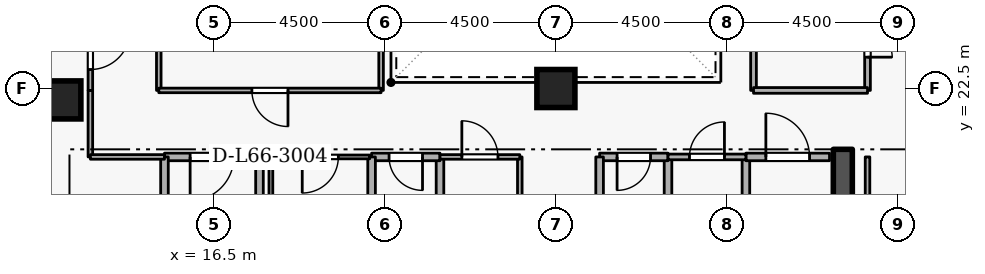
"""IFC4 building model, lengths in metres.
Left out: names, types, materials, properties, quantities, classifications, styles, units other than length and angle.
Written with IfcOpenShell. Run it as: python <this file> out.ifc"""

import sys

from ifc_helpers import new_model, si_unit, direction, frame, frame_2d, origin, origin_2d, place, context, subcontext, project, spatial, rectangle, extrude, element, fill, save


model = new_model("IFC4")
c1 = context("Model", 3, precision=1e-05, world=origin(), true_north=direction((0.0, 1.0)))
c2 = subcontext(c1, "Body", "Model", "MODEL_VIEW")
j1 = project(units=[si_unit("LENGTHUNIT", "METRE"), si_unit("PLANEANGLEUNIT", "RADIAN")], contexts=[c1])
p1 = place(None, origin())
s1 = spatial("IfcSite", under=j1, at=p1, CompositionType="ELEMENT")
p2 = place(p1, origin())
s2 = spatial("IfcBuilding", under=s1, at=p2, CompositionType="ELEMENT")
p3 = place(p2, frame((0.0, 0.0, 247.5)))
s3 = spatial("IfcBuildingStorey", under=s2, at=p3, CompositionType="ELEMENT", Elevation=247.5)
p4 = place(p3, frame((33.05, 15.1, 0.0), z_axis=(0.0, 0.0, 1.0), x_axis=(0.0, 1.0, 0.0)))
e1 = element("IfcWall", 1, at=p4, inside=s3, PredefinedType="SHEAR", context=c2, shape_type="SweptSolid", body=[
    extrude(rectangle(XDim=5.8, YDim=0.5, at=frame_2d((2.9, 0.0))), origin(), (0.0, 0.0, 1.0), 3.6),
])
for number, where, z_axis, x_axis in (
    (2, (12.5, 22.2, 0.0), (0.0, 0.0, 1.0), (1.0, 0.0, 0.0)),
    (3, (25.5, 22.5, 0.0), (0.0, 0.0, 1.0), (1.0, 0.0, 0.0)),
):
    element("IfcColumn", number, at=place(p3, frame(where, z_axis=z_axis, x_axis=x_axis)), inside=s3, PredefinedType="COLUMN", context=c2, shape_type="SweptSolid", body=[
        extrude(rectangle(XDim=1.0, YDim=1.0, at=origin_2d()), origin(), (0.0, 0.0, 1.0), 3.6),
    ])
p5 = place(p3, frame((17.7, 18.4, 0.0), z_axis=(0.0, 0.0, 1.0), x_axis=(0.0, 1.0, 0.0)))
e4 = element("IfcWall", 4, at=p5, inside=s3, PredefinedType="STANDARD", context=c2, shape_type="SweptSolid", body=[
    extrude(rectangle(XDim=2.3, YDim=0.2, at=frame_2d((1.15, 0.0))), origin(), (0.0, 0.0, 1.0), 2.545),
])
p6 = place(p3, frame((17.7, 20.7, 0.0), z_axis=(0.0, 0.0, 1.0), x_axis=(-1.0, 0.0, 0.0)))
e5 = element("IfcWall", 5, at=p6, inside=s3, PredefinedType="STANDARD", context=c2, shape_type="SweptSolid", body=[
    extrude(rectangle(XDim=2.5, YDim=0.2, at=frame_2d((1.25, 0.0))), origin(), (0.0, 0.0, 1.0), 3.34),
])
p7 = place(p6, frame((0.675, 0.0, 0.0)))
e6 = element("IfcOpeningElement", 6, at=p7, cuts=e5, PredefinedType="OPENING", context=c2, shape_type="SweptSolid", body=[
    extrude(rectangle(XDim=1.15, YDim=2.1, at=frame_2d((0.575, 1.05))), frame((0.0, 0.11, 0.0), z_axis=(0.0, -1.0, 0.0), x_axis=(1.0, 0.0, 0.0)), (0.0, 0.0, 1.0), 0.22),
])
p8 = place(p3, frame((15.2, 20.7, 0.0), z_axis=(0.0, 0.0, 1.0), x_axis=(0.0, -1.0, 0.0)))
e7 = element("IfcWall", 7, at=p8, inside=s3, PredefinedType="STANDARD", context=c2, shape_type="SweptSolid", body=[
    extrude(rectangle(XDim=5.7, YDim=0.2, at=frame_2d((2.85, 0.0))), origin(), (0.0, 0.0, 1.0), 3.34),
])
p9 = place(p3, frame((28.45, 18.65, 0.0), z_axis=(0.0, 0.0, 1.0), x_axis=(0.0, 1.0, 0.0)))
e8 = element("IfcWall", 8, at=p9, inside=s3, PredefinedType="STANDARD", context=c2, shape_type="SweptSolid", body=[
    extrude(rectangle(XDim=2.05, YDim=0.2, at=frame_2d((1.025, 0.0))), origin(), (0.0, 0.0, 1.0), 3.34),
])
p10 = place(p3, frame((28.45, 20.7, 0.0), z_axis=(0.0, 0.0, 1.0), x_axis=(-1.0, 0.0, 0.0)))
e9 = element("IfcWall", 9, at=p10, inside=s3, PredefinedType="STANDARD", context=c2, shape_type="SweptSolid", body=[
    extrude(rectangle(XDim=1.8, YDim=0.2, at=frame_2d((0.9, 0.0))), origin(), (0.0, 0.0, 1.0), 3.34),
])
p11 = place(p10, frame((0.46, 0.0, 0.0)))
e10 = element("IfcOpeningElement", 10, at=p11, cuts=e9, PredefinedType="OPENING", context=c2, shape_type="SweptSolid", body=[
    extrude(rectangle(XDim=0.88, YDim=2.04, at=frame_2d((0.44, 1.02))), frame((0.0, 0.11, 0.0), z_axis=(0.0, -1.0, 0.0), x_axis=(1.0, 0.0, 0.0)), (0.0, 0.0, 1.0), 0.22),
])
for number, where, z_axis, x_axis in (
    (11, (26.65, 20.7, 0.0), (0.0, 0.0, 1.0), (0.0, -1.0, 0.0)),
    (12, (22.45, 18.65, 0.0), (0.0, 0.0, 1.0), (0.0, 1.0, 0.0)),
):
    element("IfcWall", number, at=place(p3, frame(where, z_axis=z_axis, x_axis=x_axis)), inside=s3, PredefinedType="STANDARD", context=c2, shape_type="SweptSolid", body=[
        extrude(rectangle(XDim=2.05, YDim=0.2, at=frame_2d((1.025, 0.0))), origin(), (0.0, 0.0, 1.0), 3.34),
    ])
p12 = place(p3, frame((22.45, 20.7, 0.0), z_axis=(0.0, 0.0, 1.0), x_axis=(-1.0, 0.0, 0.0)))
e13 = element("IfcWall", 13, at=p12, inside=s3, PredefinedType="STANDARD", context=c2, shape_type="SweptSolid", body=[
    extrude(rectangle(XDim=1.8, YDim=0.2, at=frame_2d((0.9, 0.0))), origin(), (0.0, 0.0, 1.0), 3.34),
])
p13 = place(p12, frame((0.46, 0.0, 0.0)))
e14 = element("IfcOpeningElement", 14, at=p13, cuts=e13, PredefinedType="OPENING", context=c2, shape_type="SweptSolid", body=[
    extrude(rectangle(XDim=0.88, YDim=2.04, at=frame_2d((0.44, 1.02))), frame((0.0, 0.11, 0.0), z_axis=(0.0, -1.0, 0.0), x_axis=(1.0, 0.0, 0.0)), (0.0, 0.0, 1.0), 0.22),
])
for number, where, z_axis, x_axis in (
    (15, (20.65, 20.7, 0.0), (0.0, 0.0, 1.0), (0.0, -1.0, 0.0)),
    (16, (30.5, 18.65, 0.0), (0.0, 0.0, 1.0), (0.0, 1.0, 0.0)),
):
    element("IfcWall", number, at=place(p3, frame(where, z_axis=z_axis, x_axis=x_axis)), inside=s3, PredefinedType="STANDARD", context=c2, shape_type="SweptSolid", body=[
        extrude(rectangle(XDim=2.05, YDim=0.2, at=frame_2d((1.025, 0.0))), origin(), (0.0, 0.0, 1.0), 3.34),
    ])
p14 = place(p3, frame((30.5, 20.7, 0.0), z_axis=(0.0, 0.0, 1.0), x_axis=(1.0, 0.0, 0.0)))
e17 = element("IfcWall", 17, at=p14, inside=s3, PredefinedType="STANDARD", context=c2, shape_type="SweptSolid", body=[
    extrude(rectangle(XDim=2.2, YDim=0.2, at=frame_2d((1.1, 0.0))), origin(), (0.0, 0.0, 1.0), 3.34),
])
p15 = place(p14, frame((0.525, 0.0, 0.0)))
e18 = element("IfcOpeningElement", 18, at=p15, cuts=e17, PredefinedType="OPENING", context=c2, shape_type="SweptSolid", body=[
    extrude(rectangle(XDim=1.15, YDim=2.1, at=frame_2d((0.575, 1.05))), frame((0.0, 0.11, 0.0), z_axis=(0.0, -1.0, 0.0), x_axis=(1.0, 0.0, 0.0)), (0.0, 0.0, 1.0), 0.22),
])
p16 = place(p3, frame((20.6, 20.7, 0.0), z_axis=(0.0, 0.0, 1.0), x_axis=(-1.0, 0.0, 0.0)))
e19 = element("IfcWall", 19, at=p16, inside=s3, PredefinedType="PARTITIONING", context=c2, shape_type="SweptSolid", body=[
    extrude(rectangle(XDim=2.6, YDim=0.1, at=frame_2d((1.3, 0.0))), origin(), (0.0, 0.0, 1.0), 3.34),
])
p17 = place(p16, frame((0.825, 0.0, 0.0)))
e20 = element("IfcOpeningElement", 20, at=p17, cuts=e19, PredefinedType="OPENING", context=c2, shape_type="SweptSolid", body=[
    extrude(rectangle(XDim=0.95, YDim=2.1, at=frame_2d((0.475, 1.05))), frame((0.0, 0.06, 0.0), z_axis=(0.0, -1.0, 0.0), x_axis=(1.0, 0.0, 0.0)), (0.0, 0.0, 1.0), 0.12),
])
p18 = place(p3, frame((18.0, 20.7, 0.0), z_axis=(0.0, 0.0, 1.0), x_axis=(0.0, -1.0, 0.0)))
e21 = element("IfcWall", 21, at=p18, inside=s3, PredefinedType="PARTITIONING", context=c2, shape_type="SweptSolid", body=[
    extrude(rectangle(XDim=2.05, YDim=0.1, at=frame_2d((1.025, 0.0))), origin(), (0.0, 0.0, 1.0), 2.545),
])
p19 = place(p3, frame((24.55, 20.7, 0.0), z_axis=(0.0, 0.0, 1.0), x_axis=(0.0, -1.0, 0.0)))
e22 = element("IfcWall", 22, at=p19, inside=s3, PredefinedType="PARTITIONING", context=c2, shape_type="SweptSolid", body=[
    extrude(rectangle(XDim=2.05, YDim=0.12, at=frame_2d((1.025, 0.0))), origin(), (0.0, 0.0, 1.0), 3.34),
])
p20 = place(p3, frame((22.45, 20.7, 0.0), z_axis=(0.0, 0.0, 1.0), x_axis=(1.0, 0.0, 0.0)))
e23 = element("IfcWall", 23, at=p20, inside=s3, PredefinedType="PARTITIONING", context=c2, shape_type="SweptSolid", body=[
    extrude(rectangle(XDim=2.1, YDim=0.12, at=frame_2d((1.05, 0.0))), origin(), (0.0, 0.0, 1.0), 3.34),
])
p21 = place(p20, frame((0.575, 0.0, 0.0)))
e24 = element("IfcOpeningElement", 24, at=p21, cuts=e23, PredefinedType="OPENING", context=c2, shape_type="SweptSolid", body=[
    extrude(rectangle(XDim=0.95, YDim=2.1, at=frame_2d((0.475, 1.05))), frame((0.0, 0.07, 0.0), z_axis=(0.0, -1.0, 0.0), x_axis=(1.0, 0.0, 0.0)), (0.0, 0.0, 1.0), 0.14),
])
p22 = place(p3, frame((28.45, 20.7, 0.0), z_axis=(0.0, 0.0, 1.0), x_axis=(1.0, 0.0, 0.0)))
e25 = element("IfcWall", 25, at=p22, inside=s3, PredefinedType="PARTITIONING", context=c2, shape_type="SweptSolid", body=[
    extrude(rectangle(XDim=2.05, YDim=0.15, at=frame_2d((1.025, 0.0))), origin(), (0.0, 0.0, 1.0), 3.34),
])
p23 = place(p22, frame((0.565, 0.0, 0.0)))
e26 = element("IfcOpeningElement", 26, at=p23, cuts=e25, PredefinedType="OPENING", context=c2, shape_type="SweptSolid", body=[
    extrude(rectangle(XDim=0.92, YDim=2.08, at=frame_2d((0.46, 1.04))), frame((0.0, 0.085, 0.0), z_axis=(0.0, -1.0, 0.0), x_axis=(1.0, 0.0, 0.0)), (0.0, 0.0, 1.0), 0.17),
])
p24 = place(p3, frame((33.7, 20.7, 0.0), z_axis=(0.0, 0.0, 1.0), x_axis=(0.0, -1.0, 0.0)))
e27 = element("IfcWall", 27, at=p24, inside=s3, PredefinedType="PARTITIONING", context=c2, shape_type="SweptSolid", body=[
    extrude(rectangle(XDim=5.9, YDim=0.12, at=frame_2d((2.95, 0.0))), origin(), (0.0, 0.0, 1.0), 3.34),
])
p25 = place(p3, frame((13.25, 22.45, 0.0), z_axis=(0.0, 0.0, 1.0), x_axis=(0.0, -1.0, 0.0)))
e28 = element("IfcWall", 28, at=p25, inside=s3, PredefinedType="PARTITIONING", context=c2, shape_type="SweptSolid", body=[
    extrude(rectangle(XDim=1.75, YDim=0.12, at=frame_2d((0.875, 0.0))), origin(), (0.0, 0.0, 1.0), 3.34),
])
p26 = place(p3, frame((13.25, 20.7, 0.0), z_axis=(0.0, 0.0, 1.0), x_axis=(1.0, 0.0, 0.0)))
e29 = element("IfcWall", 29, at=p26, inside=s3, PredefinedType="PARTITIONING", context=c2, shape_type="SweptSolid", body=[
    extrude(rectangle(XDim=1.95, YDim=0.12, at=frame_2d((0.975, 0.0))), origin(), (0.0, 0.0, 1.0), 3.34),
])
p27 = place(p3, frame((13.25, 24.6, 0.0), z_axis=(0.0, 0.0, 1.0), x_axis=(0.0, -1.0, 0.0)))
e30 = element("IfcWall", 30, at=p27, inside=s3, PredefinedType="PARTITIONING", context=c2, shape_type="SweptSolid", body=[
    extrude(rectangle(XDim=2.15, YDim=0.12, at=frame_2d((1.075, 0.0))), origin(), (0.0, 0.0, 1.0), 3.34),
])
p28 = place(p27, frame((0.55, 0.0, 0.0)))
e31 = element("IfcOpeningElement", 31, at=p28, cuts=e30, PredefinedType="OPENING", context=c2, shape_type="SweptSolid", body=[
    extrude(rectangle(XDim=1.05, YDim=2.1, at=frame_2d((0.525, 1.05))), frame((0.0, 0.07, 0.0), z_axis=(0.0, -1.0, 0.0), x_axis=(1.0, 0.0, 0.0)), (0.0, 0.0, 1.0), 0.14),
])
for number, where, z_axis, x_axis in (
    (32, (15.05, 22.45, 0.0), (0.0, 0.0, 1.0), (0.0, 1.0, 0.0)),
    (33, (20.9, 26.2, 0.0), (0.0, 0.0, 1.0), (0.0, -1.0, 0.0)),
):
    element("IfcWall", number, at=place(p3, frame(where, z_axis=z_axis, x_axis=x_axis)), inside=s3, PredefinedType="PARTITIONING", context=c2, shape_type="SweptSolid", body=[
        extrude(rectangle(XDim=3.75, YDim=0.12, at=frame_2d((1.875, 0.0))), origin(), (0.0, 0.0, 1.0), 3.34),
    ])
p29 = place(p3, frame((20.9, 22.45, 0.0), z_axis=(0.0, 0.0, 1.0), x_axis=(-1.0, 0.0, 0.0)))
e34 = element("IfcWall", 34, at=p29, inside=s3, PredefinedType="PARTITIONING", context=c2, shape_type="SweptSolid", body=[
    extrude(rectangle(XDim=5.85, YDim=0.12, at=frame_2d((2.925, 0.0))), origin(), (0.0, 0.0, 1.0), 3.34),
])
p30 = place(p29, frame((2.45, 0.0, 0.0)))
e35 = element("IfcOpeningElement", 35, at=p30, cuts=e34, PredefinedType="OPENING", context=c2, shape_type="SweptSolid", body=[
    extrude(rectangle(XDim=0.95, YDim=2.1, at=frame_2d((0.475, 1.05))), frame((0.0, 0.07, 0.0), z_axis=(0.0, -1.0, 0.0), x_axis=(1.0, 0.0, 0.0)), (0.0, 0.0, 1.0), 0.14),
])
p31 = place(p3, frame((30.7, 22.45, 0.0), z_axis=(0.0, 0.0, 1.0), x_axis=(0.0, 1.0, 0.0)))
e36 = element("IfcWall", 36, at=p31, inside=s3, PredefinedType="PARTITIONING", context=c2, shape_type="SweptSolid", body=[
    extrude(rectangle(XDim=3.05, YDim=0.15, at=frame_2d((1.525, 0.0))), origin(), (0.0, 0.0, 1.0), 3.34),
])
p32 = place(p3, frame((33.7, 25.5, 0.0), z_axis=(0.0, 0.0, 1.0), x_axis=(0.0, -1.0, 0.0)))
e37 = element("IfcWall", 37, at=p32, inside=s3, PredefinedType="PARTITIONING", context=c2, shape_type="SweptSolid", body=[
    extrude(rectangle(XDim=3.05, YDim=0.15, at=frame_2d((1.525, 0.0))), origin(), (0.0, 0.0, 1.0), 3.34),
])
p33 = place(p32, frame((0.875, 0.0, 0.0)))
e38 = element("IfcOpeningElement", 38, at=p33, cuts=e37, PredefinedType="OPENING", context=c2, shape_type="SweptSolid", body=[
    extrude(rectangle(XDim=1.3, YDim=2.12, at=frame_2d((0.65, 1.06))), frame((0.0, 0.085, 0.0), z_axis=(0.0, -1.0, 0.0), x_axis=(1.0, 0.0, 0.0)), (0.0, 0.0, 1.0), 0.17),
])
p34 = place(p3, frame((33.7, 22.45, 0.0), z_axis=(0.0, 0.0, 1.0), x_axis=(-1.0, 0.0, 0.0)))
e39 = element("IfcWall", 39, at=p34, inside=s3, PredefinedType="PARTITIONING", context=c2, shape_type="SweptSolid", body=[
    extrude(rectangle(XDim=3.0, YDim=0.15, at=frame_2d((1.5, 0.0))), origin(), (0.0, 0.0, 1.0), 3.34),
])
p35 = place(p7, origin())
e40 = element("IfcDoor", 40, at=p35, inside=s3, OperationType="SINGLE_SWING_RIGHT", PredefinedType="DOOR", context=c2, shape_type="SweptSolid", body=[
    extrude(rectangle(XDim=1.15, YDim=2.1, at=frame_2d((0.575, 1.05))), frame((0.0, 0.025, 0.0), z_axis=(0.0, -1.0, 0.0), x_axis=(1.0, 0.0, 0.0)), (0.0, 0.0, 1.0), 0.05),
])
fill(e6, e40)
p36 = place(p11, origin())
e41 = element("IfcDoor", 41, at=p36, inside=s3, OperationType="SINGLE_SWING_RIGHT", PredefinedType="DOOR", context=c2, shape_type="SweptSolid", body=[
    extrude(rectangle(XDim=0.88, YDim=2.04, at=frame_2d((0.44, 1.02))), frame((0.0, 0.025, 0.0), z_axis=(0.0, -1.0, 0.0), x_axis=(1.0, 0.0, 0.0)), (0.0, 0.0, 1.0), 0.05),
])
fill(e10, e41)
p37 = place(p13, origin())
e42 = element("IfcDoor", 42, at=p37, inside=s3, OperationType="SINGLE_SWING_LEFT", PredefinedType="DOOR", context=c2, shape_type="SweptSolid", body=[
    extrude(rectangle(XDim=0.88, YDim=2.04, at=frame_2d((0.44, 1.02))), frame((0.0, 0.025, 0.0), z_axis=(0.0, -1.0, 0.0), x_axis=(1.0, 0.0, 0.0)), (0.0, 0.0, 1.0), 0.05),
])
fill(e14, e42)
p38 = place(p17, origin())
e43 = element("IfcDoor", 43, at=p38, inside=s3, OperationType="SINGLE_SWING_RIGHT", PredefinedType="DOOR", context=c2, shape_type="SweptSolid", body=[
    extrude(rectangle(XDim=0.95, YDim=2.1, at=frame_2d((0.475, 1.05))), frame((0.0, 0.025, 0.0), z_axis=(0.0, -1.0, 0.0), x_axis=(1.0, 0.0, 0.0)), (0.0, 0.0, 1.0), 0.05),
])
fill(e20, e43)
p39 = place(p21, origin())
e44 = element("IfcDoor", 44, at=p39, inside=s3, OperationType="SINGLE_SWING_LEFT", PredefinedType="DOOR", context=c2, shape_type="SweptSolid", body=[
    extrude(rectangle(XDim=0.95, YDim=2.1, at=frame_2d((0.475, 1.05))), frame((0.0, 0.025, 0.0), z_axis=(0.0, -1.0, 0.0), x_axis=(1.0, 0.0, 0.0)), (0.0, 0.0, 1.0), 0.05),
])
fill(e24, e44)
p40 = place(p23, origin())
e45 = element("IfcDoor", 45, at=p40, inside=s3, OperationType="SINGLE_SWING_RIGHT", PredefinedType="DOOR", context=c2, shape_type="SweptSolid", body=[
    extrude(rectangle(XDim=0.92, YDim=2.08, at=frame_2d((0.46, 1.04))), frame((0.0, 0.025, 0.0), z_axis=(0.0, -1.0, 0.0), x_axis=(1.0, 0.0, 0.0)), (0.0, 0.0, 1.0), 0.05),
])
fill(e26, e45)
p41 = place(p15, origin())
e46 = element("IfcDoor", 46, at=p41, inside=s3, OperationType="SINGLE_SWING_LEFT", PredefinedType="DOOR", context=c2, shape_type="SweptSolid", body=[
    extrude(rectangle(XDim=1.15, YDim=2.1, at=frame_2d((0.575, 1.05))), frame((0.0, 0.025, 0.0), z_axis=(0.0, -1.0, 0.0), x_axis=(1.0, 0.0, 0.0)), (0.0, 0.0, 1.0), 0.05),
])
fill(e18, e46)
p42 = place(p28, origin())
e47 = element("IfcDoor", 47, at=p42, inside=s3, OperationType="SINGLE_SWING_LEFT", PredefinedType="DOOR", context=c2, shape_type="SweptSolid", body=[
    extrude(rectangle(XDim=1.05, YDim=2.1, at=frame_2d((0.525, 1.05))), frame((0.0, 0.025, 0.0), z_axis=(0.0, -1.0, 0.0), x_axis=(1.0, 0.0, 0.0)), (0.0, 0.0, 1.0), 0.05),
])
fill(e31, e47)
p43 = place(p30, origin())
e48 = element("IfcDoor", 48, at=p43, inside=s3, OperationType="SINGLE_SWING_LEFT", PredefinedType="DOOR", context=c2, shape_type="SweptSolid", body=[
    extrude(rectangle(XDim=0.95, YDim=2.1, at=frame_2d((0.475, 1.05))), frame((0.0, 0.025, 0.0), z_axis=(0.0, -1.0, 0.0), x_axis=(1.0, 0.0, 0.0)), (0.0, 0.0, 1.0), 0.05),
])
fill(e35, e48)
p44 = place(p33, origin())
e49 = element("IfcDoor", 49, at=p44, inside=s3, OperationType="DOUBLE_DOOR_SINGLE_SWING", PredefinedType="DOOR", context=c2, shape_type="SweptSolid", body=[
    extrude(rectangle(XDim=1.3, YDim=2.12, at=frame_2d((0.65, 1.06))), frame((0.0, 0.025, 0.0), z_axis=(0.0, -1.0, 0.0), x_axis=(1.0, 0.0, 0.0)), (0.0, 0.0, 1.0), 0.05),
])
fill(e38, e49)
save(model, sys.argv[1])
